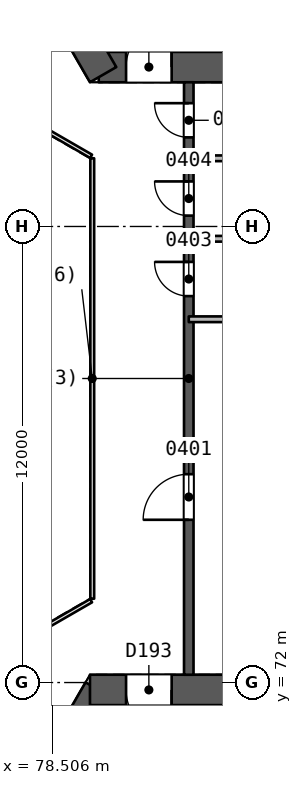
"""IFC4 building model, lengths in metres.
Left out: names, types, materials, properties, quantities, classifications, styles, units other than length and angle.
Written with IfcOpenShell. Run it as: python <this file> out.ifc"""

import sys

from ifc_helpers import new_model, si_unit, direction, frame, frame_2d, origin, place, context, subcontext, project, spatial, rectangle, extrude, element, fill, save


model = new_model("IFC4")
c1 = context("Model", 3, precision=1e-05, world=origin(), true_north=direction((0.0, 1.0)))
c2 = subcontext(c1, "Body", "Model", "MODEL_VIEW")
j1 = project(units=[si_unit("LENGTHUNIT", "METRE"), si_unit("PLANEANGLEUNIT", "RADIAN")], contexts=[c1])
p1 = place(None, origin())
s1 = spatial("IfcSite", under=j1, at=p1, CompositionType="ELEMENT")
p2 = place(p1, origin())
s2 = spatial("IfcBuilding", under=s1, at=p2, CompositionType="ELEMENT")
p3 = place(p2, frame((0.0, 0.0, 25.4)))
s3 = spatial("IfcBuildingStorey", under=s2, at=p3, CompositionType="ELEMENT", Elevation=25.4)
p4 = place(p3, frame((79.731, 88.194, 0.0), z_axis=(0.0, 0.0, 1.0), x_axis=(1.0, 0.0, 0.0)))
e1 = element("IfcWall", 1, at=p4, inside=s3, PredefinedType="SHEAR", context=c2, shape_type="SweptSolid", body=[
    extrude(rectangle(XDim=10.149, YDim=0.8, at=frame_2d((5.074, 0.0))), origin(), (0.0, 0.0, 1.0), 4.6),
])
p5 = place(p4, frame((0.719, 0.0, 0.0)))
e2 = element("IfcOpeningElement", 2, at=p5, cuts=e1, PredefinedType="OPENING", context=c2, shape_type="SweptSolid", body=[
    extrude(rectangle(XDim=1.2, YDim=2.1, at=frame_2d((0.6, 1.05))), frame((0.0, 0.411, 0.0), z_axis=(0.0, -1.0, 0.0), x_axis=(1.0, 0.0, 0.0)), (0.0, 0.0, 1.0), 0.821),
])
p6 = place(p3, frame((74.856, 96.637, 0.0), z_axis=(0.0, 0.0, 1.0), x_axis=(0.499993500917, -0.866029155999, 0.0)))
e3 = element("IfcWall", 3, at=p6, inside=s3, PredefinedType="SHEAR", context=c2, shape_type="SweptSolid", body=[
    extrude(rectangle(XDim=9.98, YDim=0.8, at=frame_2d((4.99, 0.0))), origin(), (0.0, 0.0, 1.0), 4.6),
])
p7 = place(p6, frame((7.83, 0.0, 0.0)))
e4 = element("IfcOpeningElement", 4, at=p7, cuts=e3, PredefinedType="OPENING", context=c2, shape_type="SweptSolid", body=[
    extrude(rectangle(XDim=1.2, YDim=2.1, at=frame_2d((0.6, 1.05))), frame((0.0, 0.411, 0.0), z_axis=(0.0, -1.0, 0.0), x_axis=(1.0, 0.0, 0.0)), (0.0, 0.0, 1.0), 0.821),
])
p8 = place(p3, frame((79.731, 71.806, 0.0), z_axis=(0.0, 0.0, 1.0), x_axis=(-0.49999662545, -0.866027352073, 0.0)))
e5 = element("IfcWall", 5, at=p8, inside=s3, PredefinedType="SHEAR", context=c2, shape_type="SweptSolid", body=[
    extrude(rectangle(XDim=10.149, YDim=0.8, at=frame_2d((5.074, 0.0))), origin(), (0.0, 0.0, 1.0), 4.6),
])
p9 = place(p8, frame((0.719, 0.0, 0.0)))
e6 = element("IfcOpeningElement", 6, at=p9, cuts=e5, PredefinedType="OPENING", context=c2, shape_type="SweptSolid", body=[
    extrude(rectangle(XDim=1.2, YDim=2.1, at=frame_2d((0.6, 1.05))), frame((0.0, 0.411, 0.0), z_axis=(0.0, -1.0, 0.0), x_axis=(1.0, 0.0, 0.0)), (0.0, 0.0, 1.0), 0.821),
])
p10 = place(p3, frame((89.48, 71.806, 0.0), z_axis=(0.0, 0.0, 1.0), x_axis=(-1.0, 0.0, 0.0)))
e7 = element("IfcWall", 7, at=p10, inside=s3, PredefinedType="SHEAR", context=c2, shape_type="SweptSolid", body=[
    extrude(rectangle(XDim=9.98, YDim=0.8, at=frame_2d((4.99, 0.0))), origin(), (0.0, 0.0, 1.0), 4.6),
])
p11 = place(p10, frame((7.83, 0.0, 0.0)))
e8 = element("IfcOpeningElement", 8, at=p11, cuts=e7, PredefinedType="OPENING", context=c2, shape_type="SweptSolid", body=[
    extrude(rectangle(XDim=1.2, YDim=2.1, at=frame_2d((0.6, 1.05))), frame((0.0, 0.411, 0.0), z_axis=(0.0, -1.0, 0.0), x_axis=(1.0, 0.0, 0.0)), (0.0, 0.0, 1.0), 0.821),
])
p12 = place(p3, frame((82.1, 72.206, 0.0), z_axis=(0.0, 0.0, 1.0), x_axis=(0.0, 1.0, 0.0)))
e9 = element("IfcWall", 9, at=p12, inside=s3, PredefinedType="SHEAR", context=c2, shape_type="SweptSolid", body=[
    extrude(rectangle(XDim=15.588, YDim=0.25, at=frame_2d((7.794, 0.0))), origin(), (0.0, 0.0, 1.0), 4.1),
])
p13 = place(p12, frame((4.076, 0.0, 0.0)))
e10 = element("IfcOpeningElement", 10, at=p13, cuts=e9, PredefinedType="OPENING", context=c2, shape_type="SweptSolid", body=[
    extrude(rectangle(XDim=1.2, YDim=2.4, at=frame_2d((0.6, 1.2))), frame((0.0, 0.135, 0.0), z_axis=(0.0, -1.0, 0.0), x_axis=(1.0, 0.0, 0.0)), (0.0, 0.0, 1.0), 0.271),
])
p14 = place(p12, frame((9.962, 0.0, 0.0)))
e11 = element("IfcOpeningElement", 11, at=p14, cuts=e9, PredefinedType="OPENING", context=c2, shape_type="SweptSolid", body=[
    extrude(rectangle(XDim=0.9, YDim=2.1, at=frame_2d((0.45, 1.05))), frame((0.0, 0.135, 0.0), z_axis=(0.0, -1.0, 0.0), x_axis=(1.0, 0.0, 0.0)), (0.0, 0.0, 1.0), 0.271),
])
p15 = place(p12, frame((12.08, 0.0, 0.0)))
e12 = element("IfcOpeningElement", 12, at=p15, cuts=e9, PredefinedType="OPENING", context=c2, shape_type="SweptSolid", body=[
    extrude(rectangle(XDim=0.9, YDim=2.1, at=frame_2d((0.45, 1.05))), frame((0.0, 0.135, 0.0), z_axis=(0.0, -1.0, 0.0), x_axis=(1.0, 0.0, 0.0)), (0.0, 0.0, 1.0), 0.271),
])
p16 = place(p12, frame((14.138, 0.0, 0.0)))
e13 = element("IfcOpeningElement", 13, at=p16, cuts=e9, PredefinedType="OPENING", context=c2, shape_type="SweptSolid", body=[
    extrude(rectangle(XDim=0.9, YDim=2.1, at=frame_2d((0.45, 1.05))), frame((0.0, 0.135, 0.0), z_axis=(0.0, -1.0, 0.0), x_axis=(1.0, 0.0, 0.0)), (0.0, 0.0, 1.0), 0.271),
])
for number, where, z_axis, x_axis in (
    (14, (86.3, 81.559, 0.0), (0.0, 0.0, 1.0), (-1.0, 0.0, 0.0)),
    (15, (86.3, 83.677, 0.0), (0.0, 0.0, 1.0), (-1.0, 0.0, 0.0)),
    (16, (86.3, 85.794, 0.0), (0.0, 0.0, 1.0), (-1.0, 0.0, 0.0)),
):
    element("IfcWall", number, at=place(p3, frame(where, z_axis=z_axis, x_axis=x_axis)), inside=s3, PredefinedType="PARTITIONING", context=c2, shape_type="SweptSolid", body=[
        extrude(rectangle(XDim=4.2, YDim=0.15, at=frame_2d((2.1, 0.0))), origin(), (0.0, 0.0, 1.0), 4.1),
    ])
p17 = place(p3, frame((79.56, 74.206, 0.0), z_axis=(0.0, 0.0, 1.0), x_axis=(0.0, 1.0, 0.0)))
e17 = element("IfcWall", 17, at=p17, inside=s3, PredefinedType="PARTITIONING", context=c2, shape_type="SweptSolid", body=[
    extrude(rectangle(XDim=11.588, YDim=0.1, at=frame_2d((5.794, 0.0))), origin(), (0.0, 0.0, 1.0), 4.1),
])
for number, where, z_axis, x_axis in (
    (18, (79.53, 85.846, 0.0), (0.0, 0.0, 1.0), (-0.866, 0.5, 0.0)),
    (19, (77.798, 73.154, 0.0), (0.0, 0.0, 1.0), (0.866, 0.5, 0.0)),
):
    element("IfcWall", number, at=place(p3, frame(where, z_axis=z_axis, x_axis=x_axis)), inside=s3, PredefinedType="PARTITIONING", context=c2, shape_type="SweptSolid", body=[
        extrude(rectangle(XDim=2.0, YDim=0.1, at=frame_2d((1.0, 0.0))), origin(), (0.0, 0.0, 1.0), 4.1),
    ])
p18 = place(p13, origin())
e20 = element("IfcDoor", 20, at=p18, inside=s3, OperationType="SINGLE_SWING_LEFT", PredefinedType="NOTDEFINED", context=c2, shape_type="SweptSolid", body=[
    extrude(rectangle(XDim=1.2, YDim=2.4, at=frame_2d((0.6, 1.2))), frame((0.0, 0.025, 0.0), z_axis=(0.0, -1.0, 0.0), x_axis=(1.0, 0.0, 0.0)), (0.0, 0.0, 1.0), 0.05),
])
fill(e10, e20)
p19 = place(p14, origin())
e21 = element("IfcDoor", 21, at=p19, inside=s3, OperationType="SINGLE_SWING_RIGHT", PredefinedType="NOTDEFINED", context=c2, shape_type="SweptSolid", body=[
    extrude(rectangle(XDim=0.9, YDim=2.1, at=frame_2d((0.45, 1.05))), frame((0.0, 0.025, 0.0), z_axis=(0.0, -1.0, 0.0), x_axis=(1.0, 0.0, 0.0)), (0.0, 0.0, 1.0), 0.05),
])
fill(e11, e21)
p20 = place(p15, origin())
e22 = element("IfcDoor", 22, at=p20, inside=s3, OperationType="SINGLE_SWING_RIGHT", PredefinedType="NOTDEFINED", context=c2, shape_type="SweptSolid", body=[
    extrude(rectangle(XDim=0.9, YDim=2.1, at=frame_2d((0.45, 1.05))), frame((0.0, 0.025, 0.0), z_axis=(0.0, -1.0, 0.0), x_axis=(1.0, 0.0, 0.0)), (0.0, 0.0, 1.0), 0.05),
])
fill(e12, e22)
p21 = place(p16, origin())
e23 = element("IfcDoor", 23, at=p21, inside=s3, OperationType="SINGLE_SWING_RIGHT", PredefinedType="NOTDEFINED", context=c2, shape_type="SweptSolid", body=[
    extrude(rectangle(XDim=0.9, YDim=2.1, at=frame_2d((0.45, 1.05))), frame((0.0, 0.025, 0.0), z_axis=(0.0, -1.0, 0.0), x_axis=(1.0, 0.0, 0.0)), (0.0, 0.0, 1.0), 0.05),
])
fill(e13, e23)
p22 = place(p5, origin())
e24 = element("IfcDoor", 24, at=p22, inside=s3, OperationType="SINGLE_SWING_RIGHT", PredefinedType="NOTDEFINED", context=c2, shape_type="SweptSolid", body=[
    extrude(rectangle(XDim=1.2, YDim=2.1, at=frame_2d((0.6, 1.05))), frame((0.0, 0.025, 0.0), z_axis=(0.0, -1.0, 0.0), x_axis=(1.0, 0.0, 0.0)), (0.0, 0.0, 1.0), 0.05),
])
fill(e2, e24)
p23 = place(p11, origin())
e25 = element("IfcDoor", 25, at=p23, inside=s3, OperationType="SINGLE_SWING_LEFT", PredefinedType="NOTDEFINED", context=c2, shape_type="SweptSolid", body=[
    extrude(rectangle(XDim=1.2, YDim=2.1, at=frame_2d((0.6, 1.05))), frame((0.0, 0.025, 0.0), z_axis=(0.0, -1.0, 0.0), x_axis=(1.0, 0.0, 0.0)), (0.0, 0.0, 1.0), 0.05),
])
fill(e8, e25)
save(model, sys.argv[1])
